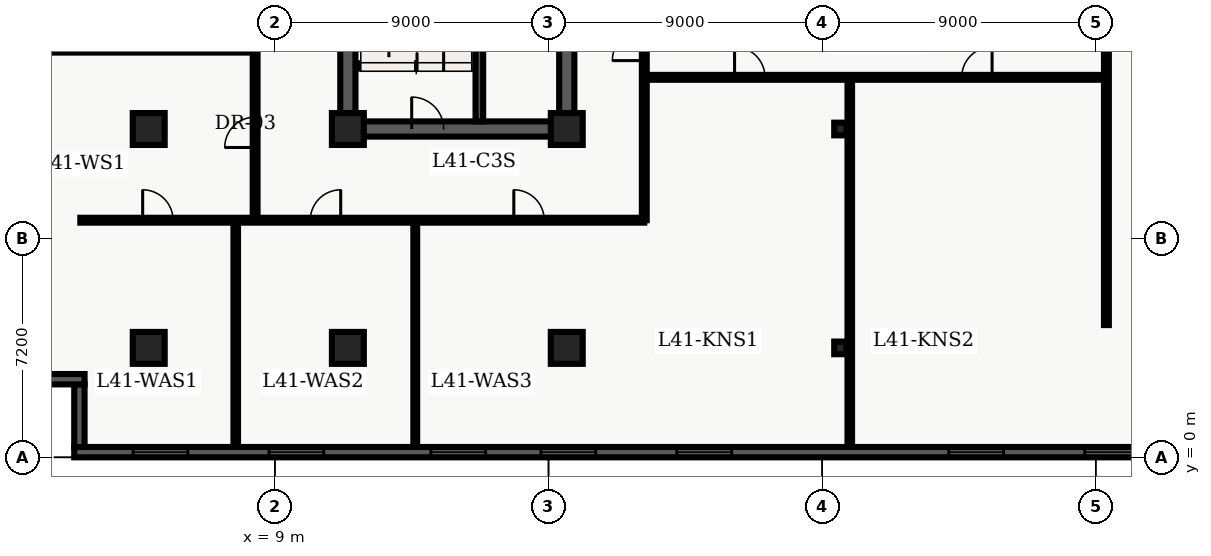
"""IFC4 building model, lengths in metres.
Left out: names, types, materials, properties, quantities, classifications, styles, units other than length and angle.
Written with IfcOpenShell. Run it as: python <this file> out.ifc"""

import sys

from ifc_helpers import new_model, entity, si_unit, converted_unit, direction, frame, origin_with_axes, origin_2d_with_axis, place, context, subcontext, project, spatial, polyline, rectangle, i_section, outline, extrude, element, fill, save


model = new_model("IFC4")
c1 = context("Model", 3, precision=1e-05, world=origin_with_axes(), true_north=direction((0.0, 1.0)))
c2 = subcontext(c1, "Body", "Model", "MODEL_VIEW")
j1 = project(units=[si_unit("LENGTHUNIT", "METRE"), converted_unit("PLANEANGLEUNIT", "DEGREE", entity("IfcPlaneAngleMeasure", 0.017), si_unit("PLANEANGLEUNIT", "RADIAN"), dimensions=[0, 0, 0, 0, 0, 0, 0])], contexts=[c1])
p1 = place(None, origin_with_axes())
s1 = spatial("IfcSite", under=j1, at=p1, CompositionType="ELEMENT")
p2 = place(p1, origin_with_axes())
s2 = spatial("IfcBuilding", under=s1, at=p2, CompositionType="ELEMENT")
p3 = place(p2, frame((0.0, 0.0, 168.0), z_axis=(0.0, 0.0, 1.0), x_axis=(1.0, 0.0, 0.0)))
s3 = spatial("IfcBuildingStorey", under=s2, at=p3, CompositionType="ELEMENT", Elevation=168.0)
p4 = place(p3, frame((11.4, 10.8, 0.0), z_axis=(0.0, 0.0, 1.0), x_axis=(0.0, 1.0, 0.0)))
e1 = element("IfcWall", 1, at=p4, inside=s3, PredefinedType="SHEAR", context=c2, shape_type="SweptSolid", body=[
    extrude(outline(polyline([(0.0, -0.25), (27.0, -0.25), (27.0, 0.25), (0.0, 0.25), (0.0, -0.25)])), origin_with_axes(), (0.0, 0.0, 1.0), 3.66),
])
p5 = place(p3, frame((11.4, 10.8, 0.0), z_axis=(0.0, 0.0, 1.0), x_axis=(1.0, 0.0, 0.0)))
e2 = element("IfcWall", 2, at=p5, inside=s3, PredefinedType="SHEAR", context=c2, shape_type="SweptSolid", body=[
    extrude(outline(polyline([(0.0, -0.25), (7.2, -0.25), (7.2, 0.25), (0.0, 0.25), (0.0, -0.25)])), origin_with_axes(), (0.0, 0.0, 1.0), 3.66),
])
p6 = place(p5, frame((2.625, 0.0, 0.0), z_axis=(0.0, 0.0, 1.0), x_axis=(1.0, 0.0, 0.0)))
e3 = element("IfcOpeningElement", 3, at=p6, cuts=e2, PredefinedType="OPENING", context=c2, shape_type="SweptSolid", body=[
    extrude(rectangle(XDim=1.05, YDim=0.52, at=origin_2d_with_axis()), origin_with_axes(), (0.0, 0.0, 1.0), 2.15),
])
p7 = place(p3, frame((18.6, 10.8, 0.0), z_axis=(0.0, 0.0, 1.0), x_axis=(0.0, 1.0, 0.0)))
e4 = element("IfcWall", 4, at=p7, inside=s3, PredefinedType="SHEAR", context=c2, shape_type="SweptSolid", body=[
    extrude(outline(polyline([(0.0, -0.25), (13.5, -0.25), (13.5, 0.25), (0.0, 0.25), (0.0, -0.25)])), origin_with_axes(), (0.0, 0.0, 1.0), 3.66),
])
p8 = place(p7, frame((11.125, 0.0, 0.0), z_axis=(0.0, 0.0, 1.0), x_axis=(1.0, 0.0, 0.0)))
e5 = element("IfcOpeningElement", 5, at=p8, cuts=e4, PredefinedType="OPENING", context=c2, shape_type="SweptSolid", body=[
    extrude(rectangle(XDim=1.05, YDim=0.52, at=origin_2d_with_axis()), origin_with_axes(), (0.0, 0.0, 1.0), 2.15),
])
p9 = place(p7, frame((4.325, 0.0, 0.0), z_axis=(0.0, 0.0, 1.0), x_axis=(1.0, 0.0, 0.0)))
e6 = element("IfcOpeningElement", 6, at=p9, cuts=e4, PredefinedType="OPENING", context=c2, shape_type="SweptSolid", body=[
    extrude(rectangle(XDim=1.05, YDim=0.52, at=origin_2d_with_axis()), origin_with_axes(), (0.0, 0.0, 1.0), 2.15),
])
p10 = place(p3, frame((15.725, 11.05, 0.0), z_axis=(0.0, 0.0, 1.0), x_axis=(0.0, 1.0, 0.0)))
e7 = element("IfcWall", 7, at=p10, inside=s3, PredefinedType="SHEAR", context=c2, shape_type="SweptSolid", body=[
    extrude(outline(polyline([(0.0, -0.125), (8.65, -0.125), (8.65, 0.125), (0.0, 0.125), (0.0, -0.125)])), origin_with_axes(), (0.0, 0.0, 1.0), 3.66),
])
for number, where, z_axis, x_axis in (
    (8, (11.4, 3.6, 0.0), (0.0, 0.0, 1.0), (1.0, 0.0, 0.0)),
    (9, (11.4, 10.8, 0.0), (0.0, 0.0, 1.0), (1.0, 0.0, 0.0)),
    (10, (18.6, 3.6, 0.0), (0.0, 0.0, 1.0), (1.0, 0.0, 0.0)),
    (11, (18.6, 10.8, 0.0), (0.0, 0.0, 1.0), (1.0, 0.0, 0.0)),
    (12, (4.85, 3.6, 0.0), (0.0, 0.0, 1.0), (1.0, 0.0, 0.0)),
    (13, (4.85, 10.8, 0.0), (0.0, 0.0, 1.0), (1.0, 0.0, 0.0)),
):
    element("IfcColumn", number, at=place(p3, frame(where, z_axis=z_axis, x_axis=x_axis)), inside=s3, PredefinedType="COLUMN", context=c2, shape_type="SweptSolid", body=[
        extrude(rectangle(XDim=1.05, YDim=1.05, at=origin_2d_with_axis()), origin_with_axes(), (0.0, 0.0, 1.0), 3.9),
    ])
for number, where, z_axis, x_axis in (
    (14, (27.6, 3.6, 0.0), (0.0, 0.0, 1.0), (1.0, 0.0, 0.0)),
    (15, (27.6, 10.8, 0.0), (0.0, 0.0, 1.0), (1.0, 0.0, 0.0)),
):
    element("IfcColumn", number, at=place(p3, frame(where, z_axis=z_axis, x_axis=x_axis)), inside=s3, PredefinedType="COLUMN", context=c2, shape_type="SweptSolid", body=[
        extrude(i_section(OverallWidth=0.406, OverallDepth=0.416, WebThickness=0.03, FlangeThickness=0.048, FilletRadius=0.022, at=origin_2d_with_axis()), origin_with_axes(), (0.0, 0.0, 1.0), 3.9),
    ])
p11 = place(p3, frame((2.6, 7.8, 0.0), z_axis=(0.0, 0.0, 1.0), x_axis=(1.0, 0.0, 0.0)))
e16 = element("IfcWall", 16, at=p11, inside=s3, PredefinedType="PARTITIONING", context=c2, shape_type="SweptSolid", body=[
    extrude(outline(polyline([(0.0, -0.08), (18.55, -0.08), (18.55, 0.08), (0.0, 0.08), (0.0, -0.08)])), origin_with_axes(), (0.0, 0.0, 1.0), 2.7),
])
p12 = place(p11, frame((2.551, 0.0, 0.0), z_axis=(0.0, 0.0, 1.0), x_axis=(1.0, 0.0, 0.0)))
e17 = element("IfcOpeningElement", 17, at=p12, cuts=e16, PredefinedType="OPENING", context=c2, shape_type="SweptSolid", body=[
    extrude(rectangle(XDim=1.0, YDim=0.18, at=origin_2d_with_axis()), origin_with_axes(), (0.0, 0.0, 1.0), 2.15),
])
p13 = place(p11, frame((8.065, 0.0, 0.0), z_axis=(0.0, 0.0, 1.0), x_axis=(1.0, 0.0, 0.0)))
e18 = element("IfcOpeningElement", 18, at=p13, cuts=e16, PredefinedType="OPENING", context=c2, shape_type="SweptSolid", body=[
    extrude(rectangle(XDim=1.0, YDim=0.18, at=origin_2d_with_axis()), origin_with_axes(), (0.0, 0.0, 1.0), 2.15),
])
p14 = place(p11, frame((14.758, 0.0, 0.0), z_axis=(0.0, 0.0, 1.0), x_axis=(1.0, 0.0, 0.0)))
e19 = element("IfcOpeningElement", 19, at=p14, cuts=e16, PredefinedType="OPENING", context=c2, shape_type="SweptSolid", body=[
    extrude(rectangle(XDim=1.0, YDim=0.18, at=origin_2d_with_axis()), origin_with_axes(), (0.0, 0.0, 1.0), 2.15),
])
p15 = place(p3, frame((21.15, 7.8, 0.0), z_axis=(0.0, 0.0, 1.0), x_axis=(0.0, 1.0, 0.0)))
e20 = element("IfcWall", 20, at=p15, inside=s3, PredefinedType="PARTITIONING", context=c2, shape_type="SweptSolid", body=[
    extrude(outline(polyline([(0.0, -0.08), (32.7, -0.08), (32.7, 0.08), (0.0, 0.08), (0.0, -0.08)])), origin_with_axes(), (0.0, 0.0, 1.0), 2.7),
])
p16 = place(p15, frame((17.983, 0.0, 0.0), z_axis=(0.0, 0.0, 1.0), x_axis=(1.0, 0.0, 0.0)))
e21 = element("IfcOpeningElement", 21, at=p16, cuts=e20, PredefinedType="OPENING", context=c2, shape_type="SweptSolid", body=[
    extrude(rectangle(XDim=1.0, YDim=0.18, at=origin_2d_with_axis()), origin_with_axes(), (0.0, 0.0, 1.0), 2.15),
])
p17 = place(p15, frame((27.302, 0.0, 0.0), z_axis=(0.0, 0.0, 1.0), x_axis=(1.0, 0.0, 0.0)))
e22 = element("IfcOpeningElement", 22, at=p17, cuts=e20, PredefinedType="OPENING", context=c2, shape_type="SweptSolid", body=[
    extrude(rectangle(XDim=1.0, YDim=0.18, at=origin_2d_with_axis()), origin_with_axes(), (0.0, 0.0, 1.0), 2.15),
])
p18 = place(p15, frame((5.775, 0.0, 0.0), z_axis=(0.0, 0.0, 1.0), x_axis=(1.0, 0.0, 0.0)))
e23 = element("IfcOpeningElement", 23, at=p18, cuts=e20, PredefinedType="OPENING", context=c2, shape_type="SweptSolid", body=[
    extrude(rectangle(XDim=1.05, YDim=0.18, at=origin_2d_with_axis()), origin_with_axes(), (0.0, 0.0, 1.0), 2.15),
])
p19 = place(p3, frame((8.35, 7.8, 0.0), z_axis=(0.0, 0.0, 1.0), x_axis=(0.0, 1.0, 0.0)))
e24 = element("IfcWall", 24, at=p19, inside=s3, PredefinedType="PARTITIONING", context=c2, shape_type="SweptSolid", body=[
    extrude(outline(polyline([(0.0, -0.08), (12.6, -0.08), (12.6, 0.08), (0.0, 0.08), (0.0, -0.08)])), origin_with_axes(), (0.0, 0.0, 1.0), 2.7),
])
p20 = place(p19, frame((2.892, 0.0, 0.0), z_axis=(0.0, 0.0, 1.0), x_axis=(1.0, 0.0, 0.0)))
e25 = element("IfcOpeningElement", 25, at=p20, cuts=e24, PredefinedType="OPENING", context=c2, shape_type="SweptSolid", body=[
    extrude(rectangle(XDim=1.0, YDim=0.18, at=origin_2d_with_axis()), origin_with_axes(), (0.0, 0.0, 1.0), 2.15),
])
p21 = place(p19, frame((9.087, 0.0, 0.0), z_axis=(0.0, 0.0, 1.0), x_axis=(1.0, 0.0, 0.0)))
e26 = element("IfcOpeningElement", 26, at=p21, cuts=e24, PredefinedType="OPENING", context=c2, shape_type="SweptSolid", body=[
    extrude(rectangle(XDim=1.0, YDim=0.18, at=origin_2d_with_axis()), origin_with_axes(), (0.0, 0.0, 1.0), 2.15),
])
p22 = place(p3, frame((0.335, 13.454, 0.0), z_axis=(0.0, 0.0, 1.0), x_axis=(1.0, 0.0, 0.0)))
e27 = element("IfcWall", 27, at=p22, inside=s3, PredefinedType="PARTITIONING", context=c2, shape_type="SweptSolid", body=[
    extrude(outline(polyline([(0.0, -0.14), (7.895, -0.14), (7.895, 0.14), (0.0, 0.14), (0.0, -0.14)])), origin_with_axes(), (0.0, 0.0, 1.0), 2.7),
])
p23 = place(p3, frame((7.712, 0.335, 0.0), z_axis=(0.0, 0.0, 1.0), x_axis=(0.0, 1.0, 0.0)))
e28 = element("IfcWall", 28, at=p23, inside=s3, PredefinedType="PARTITIONING", context=c2, shape_type="SweptSolid", body=[
    extrude(outline(polyline([(0.0, -0.075), (7.365, -0.075), (7.365, 0.075), (0.0, 0.075), (0.0, -0.075)])), origin_with_axes(), (0.0, 0.0, 1.0), 2.7),
])
p24 = place(p3, frame((13.617, 0.335, 0.0), z_axis=(0.0, 0.0, 1.0), x_axis=(0.0, 1.0, 0.0)))
e29 = element("IfcWall", 29, at=p24, inside=s3, PredefinedType="PARTITIONING", context=c2, shape_type="SweptSolid", body=[
    extrude(outline(polyline([(0.0, -0.062), (7.365, -0.062), (7.365, 0.062), (0.0, 0.062), (0.0, -0.062)])), origin_with_axes(), (0.0, 0.0, 1.0), 2.7),
])
p25 = place(p3, frame((21.15, 12.5, 0.0), z_axis=(0.0, 0.0, 1.0), x_axis=(1.0, 0.0, 0.0)))
e30 = element("IfcWall", 30, at=p25, inside=s3, PredefinedType="PARTITIONING", context=c2, shape_type="SweptSolid", body=[
    extrude(outline(polyline([(0.0, -0.08), (15.2, -0.08), (15.2, 0.08), (0.0, 0.08), (0.0, -0.08)])), origin_with_axes(), (0.0, 0.0, 1.0), 2.7),
])
p26 = place(p25, frame((3.47, 0.0, 0.0), z_axis=(0.0, 0.0, 1.0), x_axis=(1.0, 0.0, 0.0)))
e31 = element("IfcOpeningElement", 31, at=p26, cuts=e30, PredefinedType="OPENING", context=c2, shape_type="SweptSolid", body=[
    extrude(rectangle(XDim=1.0, YDim=0.18, at=origin_2d_with_axis()), origin_with_axes(), (0.0, 0.0, 1.0), 2.15),
])
p27 = place(p25, frame((10.94, 0.0, 0.0), z_axis=(0.0, 0.0, 1.0), x_axis=(1.0, 0.0, 0.0)))
e32 = element("IfcOpeningElement", 32, at=p27, cuts=e30, PredefinedType="OPENING", context=c2, shape_type="SweptSolid", body=[
    extrude(rectangle(XDim=1.0, YDim=0.18, at=origin_2d_with_axis()), origin_with_axes(), (0.0, 0.0, 1.0), 2.15),
])
p28 = place(p3, frame((36.35, 4.35, 0.0), z_axis=(0.0, 0.0, 1.0), x_axis=(0.0, 1.0, 0.0)))
e33 = element("IfcWall", 33, at=p28, inside=s3, PredefinedType="PARTITIONING", context=c2, shape_type="SweptSolid", body=[
    extrude(outline(polyline([(0.0, -0.08), (16.95, -0.08), (16.95, 0.08), (0.0, 0.08), (0.0, -0.08)])), origin_with_axes(), (0.0, 0.0, 1.0), 2.7),
])
p29 = place(p3, frame((27.909, 0.335, 0.0), z_axis=(0.0, 0.0, 1.0), x_axis=(0.0, 1.0, 0.0)))
e34 = element("IfcWall", 34, at=p29, inside=s3, PredefinedType="PARTITIONING", context=c2, shape_type="SweptSolid", body=[
    extrude(outline(polyline([(0.0, -0.075), (12.045, -0.075), (12.045, 0.075), (0.0, 0.075), (0.0, -0.075)])), origin_with_axes(), (0.0, 0.0, 1.0), 2.7),
])
p30 = place(p3, frame((57.26, 0.17, 0.0), z_axis=(0.0, 0.0, 1.0), x_axis=(-1.0, 0.0, 0.0)))
e35 = element("IfcWall", 35, at=p30, inside=s3, PredefinedType="SOLIDWALL", context=c2, shape_type="SweptSolid", body=[
    extrude(outline(polyline([(0.0, -0.17), (54.86, -0.17), (54.86, 0.17), (0.0, 0.17), (0.0, -0.17)])), origin_with_axes(), (0.0, 0.0, 1.0), 3.66),
])
p31 = place(p30, frame((2.836, 0.0, 0.45), z_axis=(0.0, 0.0, 1.0), x_axis=(1.0, 0.0, 0.0)))
e36 = element("IfcOpeningElement", 36, at=p31, cuts=e35, PredefinedType="OPENING", context=c2, shape_type="SweptSolid", body=[
    extrude(rectangle(XDim=1.8, YDim=0.36, at=origin_2d_with_axis()), origin_with_axes(), (0.0, 0.0, 1.0), 2.1),
])
p32 = place(p30, frame((7.307, 0.0, 0.45), z_axis=(0.0, 0.0, 1.0), x_axis=(1.0, 0.0, 0.0)))
e37 = element("IfcOpeningElement", 37, at=p32, cuts=e35, PredefinedType="OPENING", context=c2, shape_type="SweptSolid", body=[
    extrude(rectangle(XDim=1.8, YDim=0.36, at=origin_2d_with_axis()), origin_with_axes(), (0.0, 0.0, 1.0), 2.1),
])
p33 = place(p30, frame((11.779, 0.0, 0.45), z_axis=(0.0, 0.0, 1.0), x_axis=(1.0, 0.0, 0.0)))
e38 = element("IfcOpeningElement", 38, at=p33, cuts=e35, PredefinedType="OPENING", context=c2, shape_type="SweptSolid", body=[
    extrude(rectangle(XDim=1.8, YDim=0.36, at=origin_2d_with_axis()), origin_with_axes(), (0.0, 0.0, 1.0), 2.1),
])
p34 = place(p30, frame((16.251, 0.0, 0.45), z_axis=(0.0, 0.0, 1.0), x_axis=(1.0, 0.0, 0.0)))
e39 = element("IfcOpeningElement", 39, at=p34, cuts=e35, PredefinedType="OPENING", context=c2, shape_type="SweptSolid", body=[
    extrude(rectangle(XDim=1.8, YDim=0.36, at=origin_2d_with_axis()), origin_with_axes(), (0.0, 0.0, 1.0), 2.1),
])
p35 = place(p30, frame((20.723, 0.0, 0.45), z_axis=(0.0, 0.0, 1.0), x_axis=(1.0, 0.0, 0.0)))
e40 = element("IfcOpeningElement", 40, at=p35, cuts=e35, PredefinedType="OPENING", context=c2, shape_type="SweptSolid", body=[
    extrude(rectangle(XDim=1.8, YDim=0.36, at=origin_2d_with_axis()), origin_with_axes(), (0.0, 0.0, 1.0), 2.1),
])
p36 = place(p30, frame((25.194, 0.0, 0.45), z_axis=(0.0, 0.0, 1.0), x_axis=(1.0, 0.0, 0.0)))
e41 = element("IfcOpeningElement", 41, at=p36, cuts=e35, PredefinedType="OPENING", context=c2, shape_type="SweptSolid", body=[
    extrude(rectangle(XDim=1.8, YDim=0.36, at=origin_2d_with_axis()), origin_with_axes(), (0.0, 0.0, 1.0), 2.1),
])
p37 = place(p30, frame((34.138, 0.0, 0.45), z_axis=(0.0, 0.0, 1.0), x_axis=(1.0, 0.0, 0.0)))
e42 = element("IfcOpeningElement", 42, at=p37, cuts=e35, PredefinedType="OPENING", context=c2, shape_type="SweptSolid", body=[
    extrude(rectangle(XDim=1.8, YDim=0.36, at=origin_2d_with_axis()), origin_with_axes(), (0.0, 0.0, 1.0), 2.1),
])
p38 = place(p30, frame((38.609, 0.0, 0.45), z_axis=(0.0, 0.0, 1.0), x_axis=(1.0, 0.0, 0.0)))
e43 = element("IfcOpeningElement", 43, at=p38, cuts=e35, PredefinedType="OPENING", context=c2, shape_type="SweptSolid", body=[
    extrude(rectangle(XDim=1.8, YDim=0.36, at=origin_2d_with_axis()), origin_with_axes(), (0.0, 0.0, 1.0), 2.1),
])
p39 = place(p30, frame((42.231, 0.0, 0.45), z_axis=(0.0, 0.0, 1.0), x_axis=(1.0, 0.0, 0.0)))
e44 = element("IfcOpeningElement", 44, at=p39, cuts=e35, PredefinedType="OPENING", context=c2, shape_type="SweptSolid", body=[
    extrude(rectangle(XDim=1.8, YDim=0.36, at=origin_2d_with_axis()), origin_with_axes(), (0.0, 0.0, 1.0), 2.1),
])
p40 = place(p30, frame((47.553, 0.0, 0.45), z_axis=(0.0, 0.0, 1.0), x_axis=(1.0, 0.0, 0.0)))
e45 = element("IfcOpeningElement", 45, at=p40, cuts=e35, PredefinedType="OPENING", context=c2, shape_type="SweptSolid", body=[
    extrude(rectangle(XDim=1.8, YDim=0.36, at=origin_2d_with_axis()), origin_with_axes(), (0.0, 0.0, 1.0), 2.1),
])
p41 = place(p30, frame((52.024, 0.0, 0.45), z_axis=(0.0, 0.0, 1.0), x_axis=(1.0, 0.0, 0.0)))
e46 = element("IfcOpeningElement", 46, at=p41, cuts=e35, PredefinedType="OPENING", context=c2, shape_type="SweptSolid", body=[
    extrude(rectangle(XDim=1.8, YDim=0.36, at=origin_2d_with_axis()), origin_with_axes(), (0.0, 0.0, 1.0), 2.1),
])
p42 = place(p3, frame((2.57, 0.34, 0.0), z_axis=(0.0, 0.0, 1.0), x_axis=(0.0, 1.0, 0.0)))
e47 = element("IfcWall", 47, at=p42, inside=s3, PredefinedType="SOLIDWALL", context=c2, shape_type="SweptSolid", body=[
    extrude(outline(polyline([(0.0, -0.17), (2.06, -0.17), (2.06, 0.17), (0.0, 0.17), (0.0, -0.17)])), origin_with_axes(), (0.0, 0.0, 1.0), 3.66),
])
p43 = place(p3, frame((2.74, 2.57, 0.0), z_axis=(0.0, 0.0, 1.0), x_axis=(-1.0, 0.0, 0.0)))
e48 = element("IfcWall", 48, at=p43, inside=s3, PredefinedType="SOLIDWALL", context=c2, shape_type="SweptSolid", body=[
    extrude(outline(polyline([(0.0, -0.17), (2.74, -0.17), (2.74, 0.17), (0.0, 0.17), (0.0, -0.17)])), origin_with_axes(), (0.0, 0.0, 1.0), 3.66),
])
p44 = place(p5, frame((2.625, 0.0, 0.0), z_axis=(0.0, 0.0, 1.0), x_axis=(1.0, 0.0, 0.0)))
e49 = element("IfcDoor", 49, at=p44, inside=s3, OperationType="SINGLE_SWING_LEFT", PredefinedType="DOOR", context=c2, shape_type="SweptSolid", body=[
    extrude(rectangle(XDim=1.05, YDim=0.09, at=origin_2d_with_axis()), origin_with_axes(), (0.0, 0.0, 1.0), 2.15),
])
fill(e3, e49)
p45 = place(p19, frame((2.892, 0.0, 0.0), z_axis=(0.0, 0.0, 1.0), x_axis=(1.0, 0.0, 0.0)))
e50 = element("IfcDoor", 50, at=p45, inside=s3, OperationType="SINGLE_SWING_LEFT", PredefinedType="DOOR", context=c2, shape_type="SweptSolid", body=[
    extrude(rectangle(XDim=1.0, YDim=0.09, at=origin_2d_with_axis()), origin_with_axes(), (0.0, 0.0, 1.0), 2.15),
])
fill(e25, e50)
p46 = place(p11, frame((2.551, 0.0, 0.0), z_axis=(0.0, 0.0, 1.0), x_axis=(1.0, 0.0, 0.0)))
e51 = element("IfcDoor", 51, at=p46, inside=s3, OperationType="SINGLE_SWING_LEFT", PredefinedType="DOOR", context=c2, shape_type="SweptSolid", body=[
    extrude(rectangle(XDim=1.0, YDim=0.09, at=origin_2d_with_axis()), origin_with_axes(), (0.0, 0.0, 1.0), 2.15),
])
fill(e17, e51)
p47 = place(p11, frame((8.065, 0.0, 0.0), z_axis=(0.0, 0.0, 1.0), x_axis=(1.0, 0.0, 0.0)))
e52 = element("IfcDoor", 52, at=p47, inside=s3, OperationType="SINGLE_SWING_RIGHT", PredefinedType="DOOR", context=c2, shape_type="SweptSolid", body=[
    extrude(rectangle(XDim=1.0, YDim=0.09, at=origin_2d_with_axis()), origin_with_axes(), (0.0, 0.0, 1.0), 2.15),
])
fill(e18, e52)
p48 = place(p11, frame((14.758, 0.0, 0.0), z_axis=(0.0, 0.0, 1.0), x_axis=(1.0, 0.0, 0.0)))
e53 = element("IfcDoor", 53, at=p48, inside=s3, OperationType="SINGLE_SWING_LEFT", PredefinedType="DOOR", context=c2, shape_type="SweptSolid", body=[
    extrude(rectangle(XDim=1.0, YDim=0.09, at=origin_2d_with_axis()), origin_with_axes(), (0.0, 0.0, 1.0), 2.15),
])
fill(e19, e53)
p49 = place(p15, frame((5.775, 0.0, 0.0), z_axis=(0.0, 0.0, 1.0), x_axis=(1.0, 0.0, 0.0)))
e54 = element("IfcDoor", 54, at=p49, inside=s3, OperationType="SINGLE_SWING_LEFT", PredefinedType="DOOR", context=c2, shape_type="SweptSolid", body=[
    extrude(rectangle(XDim=1.05, YDim=0.09, at=origin_2d_with_axis()), origin_with_axes(), (0.0, 0.0, 1.0), 2.15),
])
fill(e23, e54)
p50 = place(p25, frame((3.47, 0.0, 0.0), z_axis=(0.0, 0.0, 1.0), x_axis=(1.0, 0.0, 0.0)))
e55 = element("IfcDoor", 55, at=p50, inside=s3, OperationType="SINGLE_SWING_LEFT", PredefinedType="DOOR", context=c2, shape_type="SweptSolid", body=[
    extrude(rectangle(XDim=1.0, YDim=0.09, at=origin_2d_with_axis()), origin_with_axes(), (0.0, 0.0, 1.0), 2.15),
])
fill(e31, e55)
p51 = place(p25, frame((10.94, 0.0, 0.0), z_axis=(0.0, 0.0, 1.0), x_axis=(1.0, 0.0, 0.0)))
e56 = element("IfcDoor", 56, at=p51, inside=s3, OperationType="SINGLE_SWING_RIGHT", PredefinedType="DOOR", context=c2, shape_type="SweptSolid", body=[
    extrude(rectangle(XDim=1.0, YDim=0.09, at=origin_2d_with_axis()), origin_with_axes(), (0.0, 0.0, 1.0), 2.15),
])
fill(e32, e56)
p52 = place(p30, frame((20.723, 0.0, 0.45), z_axis=(0.0, 0.0, 1.0), x_axis=(1.0, 0.0, 0.0)))
e57 = element("IfcWindow", 57, at=p52, inside=s3, PredefinedType="WINDOW", context=c2, shape_type="SweptSolid", body=[
    extrude(rectangle(XDim=1.8, YDim=0.09, at=origin_2d_with_axis()), origin_with_axes(), (0.0, 0.0, 1.0), 2.1),
])
fill(e40, e57)
p53 = place(p30, frame((25.194, 0.0, 0.45), z_axis=(0.0, 0.0, 1.0), x_axis=(1.0, 0.0, 0.0)))
e58 = element("IfcWindow", 58, at=p53, inside=s3, PredefinedType="WINDOW", context=c2, shape_type="SweptSolid", body=[
    extrude(rectangle(XDim=1.8, YDim=0.09, at=origin_2d_with_axis()), origin_with_axes(), (0.0, 0.0, 1.0), 2.1),
])
fill(e41, e58)
p54 = place(p30, frame((34.138, 0.0, 0.45), z_axis=(0.0, 0.0, 1.0), x_axis=(1.0, 0.0, 0.0)))
e59 = element("IfcWindow", 59, at=p54, inside=s3, PredefinedType="WINDOW", context=c2, shape_type="SweptSolid", body=[
    extrude(rectangle(XDim=1.8, YDim=0.09, at=origin_2d_with_axis()), origin_with_axes(), (0.0, 0.0, 1.0), 2.1),
])
fill(e42, e59)
p55 = place(p30, frame((38.609, 0.0, 0.45), z_axis=(0.0, 0.0, 1.0), x_axis=(1.0, 0.0, 0.0)))
e60 = element("IfcWindow", 60, at=p55, inside=s3, PredefinedType="WINDOW", context=c2, shape_type="SweptSolid", body=[
    extrude(rectangle(XDim=1.8, YDim=0.09, at=origin_2d_with_axis()), origin_with_axes(), (0.0, 0.0, 1.0), 2.1),
])
fill(e43, e60)
p56 = place(p30, frame((42.231, 0.0, 0.45), z_axis=(0.0, 0.0, 1.0), x_axis=(1.0, 0.0, 0.0)))
e61 = element("IfcWindow", 61, at=p56, inside=s3, PredefinedType="WINDOW", context=c2, shape_type="SweptSolid", body=[
    extrude(rectangle(XDim=1.8, YDim=0.09, at=origin_2d_with_axis()), origin_with_axes(), (0.0, 0.0, 1.0), 2.1),
])
fill(e44, e61)
p57 = place(p30, frame((47.553, 0.0, 0.45), z_axis=(0.0, 0.0, 1.0), x_axis=(1.0, 0.0, 0.0)))
e62 = element("IfcWindow", 62, at=p57, inside=s3, PredefinedType="WINDOW", context=c2, shape_type="SweptSolid", body=[
    extrude(rectangle(XDim=1.8, YDim=0.09, at=origin_2d_with_axis()), origin_with_axes(), (0.0, 0.0, 1.0), 2.1),
])
fill(e45, e62)
p58 = place(p30, frame((52.024, 0.0, 0.45), z_axis=(0.0, 0.0, 1.0), x_axis=(1.0, 0.0, 0.0)))
e63 = element("IfcWindow", 63, at=p58, inside=s3, PredefinedType="WINDOW", context=c2, shape_type="SweptSolid", body=[
    extrude(rectangle(XDim=1.8, YDim=0.09, at=origin_2d_with_axis()), origin_with_axes(), (0.0, 0.0, 1.0), 2.1),
])
fill(e46, e63)
save(model, sys.argv[1])
